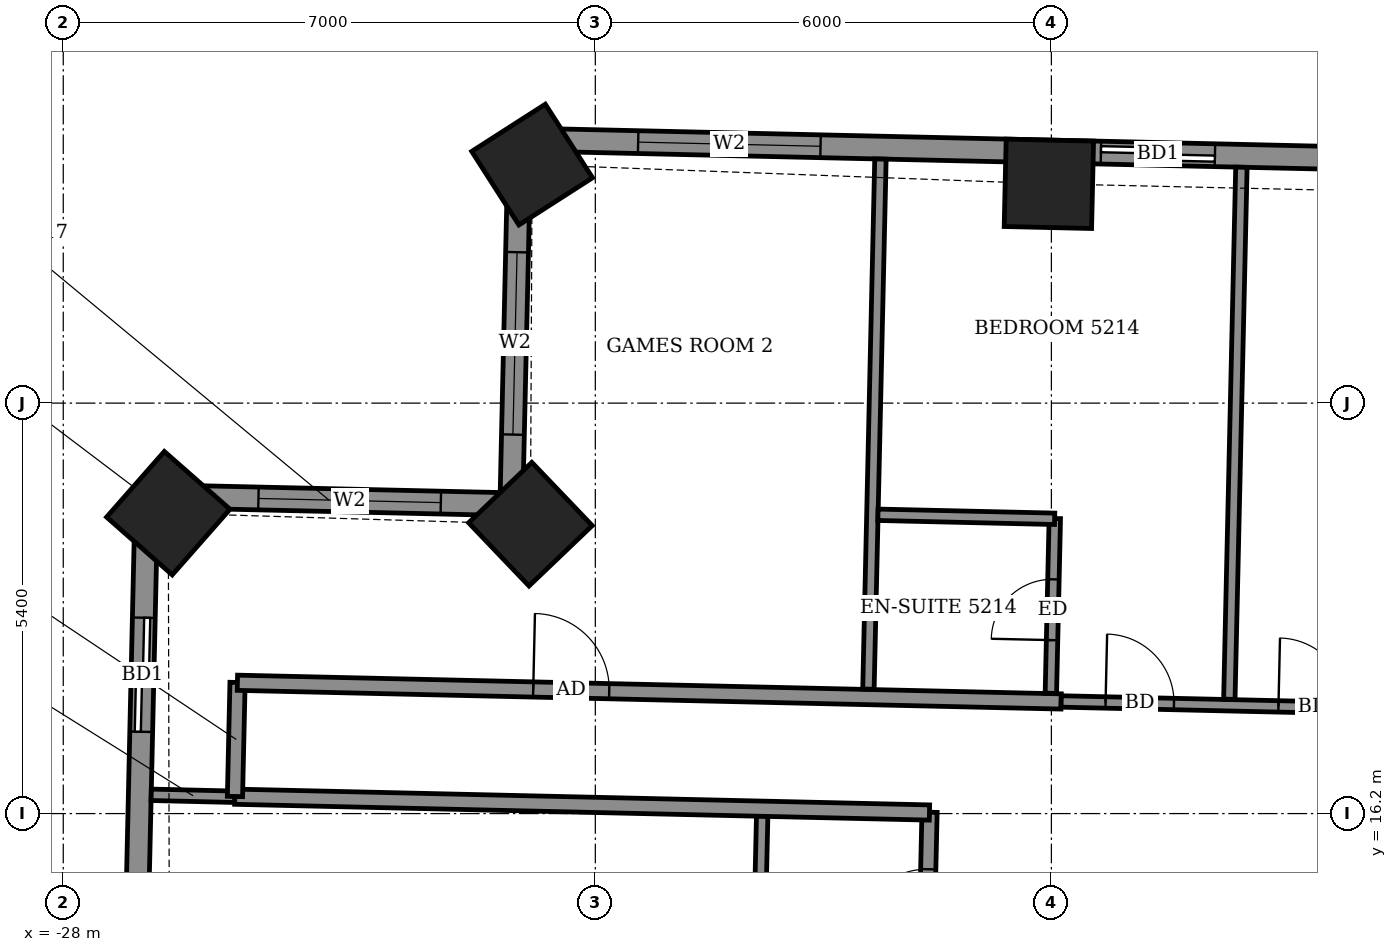
"""IFC4 building model, lengths in metres.
Left out: names, types, materials, properties, quantities, classifications, styles, units other than length and angle.
Written with IfcOpenShell. Run it as: python <this file> out.ifc"""

import sys

from ifc_helpers import new_model, si_unit, direction, frame, frame_2d, origin, origin_2d, place, context, subcontext, project, spatial, rectangle, extrude, element, fill, save


model = new_model("IFC4")
c1 = context("Model", 3, precision=1e-05, world=origin(), true_north=direction((0.0, 1.0)))
c2 = subcontext(c1, "Body", "Model", "MODEL_VIEW")
j1 = project(units=[si_unit("LENGTHUNIT", "METRE"), si_unit("PLANEANGLEUNIT", "RADIAN")], contexts=[c1])
p1 = place(None, origin())
s1 = spatial("IfcSite", under=j1, at=p1, CompositionType="ELEMENT")
p2 = place(p1, origin())
s2 = spatial("IfcBuilding", under=s1, at=p2, CompositionType="ELEMENT")
p3 = place(p2, frame((0.0, 0.0, 205.1)))
s3 = spatial("IfcBuildingStorey", under=s2, at=p3, CompositionType="ELEMENT", Elevation=205.1)
for number, where, z_axis, x_axis in (
    (1, (-15.033, 24.485, -0.55), (0.0, 0.0, 1.0), (-1.0, 0.023, 0.0)),
    (2, (-21.832, 24.738, -0.55), (0.0, 0.0, 1.0), (-0.842, -0.54, 0.0)),
    (3, (-21.854, 20.007, -0.55), (0.0, 0.0, 1.0), (-0.723, -0.691, 0.0)),
    (4, (-26.618, 20.152, -0.55), (0.0, 0.0, 1.0), (-0.661, -0.751, 0.0)),
):
    element("IfcColumn", number, at=place(p3, frame(where, z_axis=z_axis, x_axis=x_axis)), inside=s3, PredefinedType="COLUMN", context=c2, shape_type="SweptSolid", body=[
        extrude(rectangle(XDim=1.15, YDim=1.15, at=origin_2d()), origin(), (0.0, 0.0, 1.0), 3.6),
    ])
p4 = place(p3, frame((20.437, 24.106, 0.0), z_axis=(0.0, 0.0, 1.0), x_axis=(-0.999742506232, 0.022691875925, 0.0)))
e5 = element("IfcWall", 5, at=p4, inside=s3, PredefinedType="SOLIDWALL", context=c2, shape_type="SweptSolid", body=[
    extrude(rectangle(XDim=42.444, YDim=0.3, at=frame_2d((21.222, 0.0))), origin(), (0.0, 0.0, 1.0), 3.05),
])
p5 = place(p4, frame((2.287, 0.0, 0.0)))
e6 = element("IfcOpeningElement", 6, at=p5, cuts=e5, PredefinedType="OPENING", context=c2, shape_type="SweptSolid", body=[
    extrude(rectangle(XDim=1.5, YDim=2.4, at=frame_2d((0.75, 1.2))), frame((0.0, 0.16, 0.0), z_axis=(0.0, -1.0, 0.0), x_axis=(1.0, 0.0, 0.0)), (0.0, 0.0, 1.0), 0.32),
])
p6 = place(p4, frame((7.947, 0.0, 0.0)))
e7 = element("IfcOpeningElement", 7, at=p6, cuts=e5, PredefinedType="OPENING", context=c2, shape_type="SweptSolid", body=[
    extrude(rectangle(XDim=1.5, YDim=2.4, at=frame_2d((0.75, 1.2))), frame((0.0, 0.16, 0.0), z_axis=(0.0, -1.0, 0.0), x_axis=(1.0, 0.0, 0.0)), (0.0, 0.0, 1.0), 0.32),
])
p7 = place(p4, frame((11.184, 0.0, 0.0)))
e8 = element("IfcOpeningElement", 8, at=p7, cuts=e5, PredefinedType="OPENING", context=c2, shape_type="SweptSolid", body=[
    extrude(rectangle(XDim=1.5, YDim=2.4, at=frame_2d((0.75, 1.2))), frame((0.0, 0.16, 0.0), z_axis=(0.0, -1.0, 0.0), x_axis=(1.0, 0.0, 0.0)), (0.0, 0.0, 1.0), 0.32),
])
p8 = place(p4, frame((16.469, 0.0, 0.0)))
e9 = element("IfcOpeningElement", 9, at=p8, cuts=e5, PredefinedType="OPENING", context=c2, shape_type="SweptSolid", body=[
    extrude(rectangle(XDim=1.5, YDim=2.4, at=frame_2d((0.75, 1.2))), frame((0.0, 0.16, 0.0), z_axis=(0.0, -1.0, 0.0), x_axis=(1.0, 0.0, 0.0)), (0.0, 0.0, 1.0), 0.32),
])
p9 = place(p4, frame((22.02, 0.0, 0.0)))
e10 = element("IfcOpeningElement", 10, at=p9, cuts=e5, PredefinedType="OPENING", context=c2, shape_type="SweptSolid", body=[
    extrude(rectangle(XDim=1.5, YDim=2.4, at=frame_2d((0.75, 1.2))), frame((0.0, 0.16, 0.0), z_axis=(0.0, -1.0, 0.0), x_axis=(1.0, 0.0, 0.0)), (0.0, 0.0, 1.0), 0.32),
])
p10 = place(p4, frame((25.257, 0.0, 0.0)))
e11 = element("IfcOpeningElement", 11, at=p10, cuts=e5, PredefinedType="OPENING", context=c2, shape_type="SweptSolid", body=[
    extrude(rectangle(XDim=1.5, YDim=2.4, at=frame_2d((0.75, 1.2))), frame((0.0, 0.16, 0.0), z_axis=(0.0, -1.0, 0.0), x_axis=(1.0, 0.0, 0.0)), (0.0, 0.0, 1.0), 0.32),
])
p11 = place(p4, frame((30.057, 0.0, 0.0)))
e12 = element("IfcOpeningElement", 12, at=p11, cuts=e5, PredefinedType="OPENING", context=c2, shape_type="SweptSolid", body=[
    extrude(rectangle(XDim=1.5, YDim=2.4, at=frame_2d((0.75, 1.2))), frame((0.0, 0.16, 0.0), z_axis=(0.0, -1.0, 0.0), x_axis=(1.0, 0.0, 0.0)), (0.0, 0.0, 1.0), 0.32),
])
p12 = place(p4, frame((33.294, 0.0, 0.0)))
e13 = element("IfcOpeningElement", 13, at=p12, cuts=e5, PredefinedType="OPENING", context=c2, shape_type="SweptSolid", body=[
    extrude(rectangle(XDim=1.5, YDim=2.4, at=frame_2d((0.75, 1.2))), frame((0.0, 0.16, 0.0), z_axis=(0.0, -1.0, 0.0), x_axis=(1.0, 0.0, 0.0)), (0.0, 0.0, 1.0), 0.32),
])
p13 = place(p4, frame((38.484, 0.0, 0.9)))
e14 = element("IfcOpeningElement", 14, at=p13, cuts=e5, PredefinedType="OPENING", context=c2, shape_type="SweptSolid", body=[
    extrude(rectangle(XDim=2.4, YDim=1.5, at=frame_2d((1.2, 0.75))), frame((0.0, 0.16, 0.0), z_axis=(0.0, -1.0, 0.0), x_axis=(1.0, 0.0, 0.0)), (0.0, 0.0, 1.0), 0.32),
])
p14 = place(p3, frame((-21.996, 25.069, 0.0), z_axis=(0.0, 0.0, 1.0), x_axis=(-0.022683280499, -0.999742701292, 0.0)))
e15 = element("IfcWall", 15, at=p14, inside=s3, PredefinedType="SOLIDWALL", context=c2, shape_type="SweptSolid", body=[
    extrude(rectangle(XDim=4.8, YDim=0.3, at=frame_2d((2.4, 0.0))), origin(), (0.0, 0.0, 1.0), 2.55),
])
p15 = place(p14, frame((1.484, 0.0, 0.9)))
e16 = element("IfcOpeningElement", 16, at=p15, cuts=e15, PredefinedType="OPENING", context=c2, shape_type="SweptSolid", body=[
    extrude(rectangle(XDim=2.4, YDim=1.5, at=frame_2d((1.2, 0.75))), frame((0.0, 0.16, 0.0), z_axis=(0.0, -1.0, 0.0), x_axis=(1.0, 0.0, 0.0)), (0.0, 0.0, 1.0), 0.32),
])
p16 = place(p3, frame((-22.105, 20.27, 0.0), z_axis=(0.0, 0.0, 1.0), x_axis=(-0.999742701292, 0.022683280499, 0.0)))
e17 = element("IfcWall", 17, at=p16, inside=s3, PredefinedType="SOLIDWALL", context=c2, shape_type="SweptSolid", body=[
    extrude(rectangle(XDim=4.8, YDim=0.3, at=frame_2d((2.4, 0.0))), origin(), (0.0, 0.0, 1.0), 2.55),
])
p17 = place(p16, frame((0.928, 0.0, 0.9)))
e18 = element("IfcOpeningElement", 18, at=p17, cuts=e17, PredefinedType="OPENING", context=c2, shape_type="SweptSolid", body=[
    extrude(rectangle(XDim=2.4, YDim=1.5, at=frame_2d((1.2, 0.75))), frame((0.0, 0.16, 0.0), z_axis=(0.0, -1.0, 0.0), x_axis=(1.0, 0.0, 0.0)), (0.0, 0.0, 1.0), 0.32),
])
p18 = place(p3, frame((-26.904, 20.379, 0.0), z_axis=(0.0, 0.0, 1.0), x_axis=(-0.022671687694, -0.999742964255, 0.0)))
e19 = element("IfcWall", 19, at=p18, inside=s3, PredefinedType="SOLIDWALL", context=c2, shape_type="SweptSolid", body=[
    extrude(rectangle(XDim=11.824, YDim=0.3, at=frame_2d((5.912, 0.0))), origin(), (0.0, 0.0, 1.0), 2.55),
])
p19 = place(p18, frame((1.603, 0.0, 0.0)))
e20 = element("IfcOpeningElement", 20, at=p19, cuts=e19, PredefinedType="OPENING", context=c2, shape_type="SweptSolid", body=[
    extrude(rectangle(XDim=1.5, YDim=2.4, at=frame_2d((0.75, 1.2))), frame((0.0, 0.16, 0.0), z_axis=(0.0, -1.0, 0.0), x_axis=(1.0, 0.0, 0.0)), (0.0, 0.0, 1.0), 0.32),
])
p20 = place(p18, frame((7.218, 0.0, 0.9)))
e21 = element("IfcOpeningElement", 21, at=p20, cuts=e19, PredefinedType="OPENING", context=c2, shape_type="SweptSolid", body=[
    extrude(rectangle(XDim=2.4, YDim=1.5, at=frame_2d((1.2, 0.75))), frame((0.0, 0.16, 0.0), z_axis=(0.0, -1.0, 0.0), x_axis=(1.0, 0.0, 0.0)), (0.0, 0.0, 1.0), 0.32),
])
p21 = place(p3, frame((-17.247, -12.149, 0.0), z_axis=(0.0, 0.0, 1.0), x_axis=(0.022698146637, 0.999742363881, 0.0)))
e22 = element("IfcWall", 22, at=p21, inside=s3, PredefinedType="PARTITIONING", context=c2, shape_type="SweptSolid", body=[
    extrude(rectangle(XDim=28.374, YDim=0.2, at=frame_2d((14.187, 0.0))), origin(), (0.0, 0.0, 1.0), 3.05),
])
p22 = place(p21, frame((23.0, 0.0, 0.0)))
e23 = element("IfcOpeningElement", 23, at=p22, cuts=e22, PredefinedType="OPENING", context=c2, shape_type="SweptSolid", body=[
    extrude(rectangle(XDim=1.0, YDim=2.1, at=frame_2d((0.5, 1.05))), frame((0.0, 0.11, 0.0), z_axis=(0.0, -1.0, 0.0), x_axis=(1.0, 0.0, 0.0)), (0.0, 0.0, 1.0), 0.22),
])
p23 = place(p21, frame((26.724, 0.0, 0.0)))
e24 = element("IfcOpeningElement", 24, at=p23, cuts=e22, PredefinedType="OPENING", context=c2, shape_type="SweptSolid", body=[
    extrude(rectangle(XDim=0.9, YDim=2.1, at=frame_2d((0.45, 1.05))), frame((0.0, 0.11, 0.0), z_axis=(0.0, -1.0, 0.0), x_axis=(1.0, 0.0, 0.0)), (0.0, 0.0, 1.0), 0.22),
])
p24 = place(p21, frame((17.025, 0.0, 0.0)))
e25 = element("IfcOpeningElement", 25, at=p24, cuts=e22, PredefinedType="OPENING", context=c2, shape_type="SweptSolid", body=[
    extrude(rectangle(XDim=1.0, YDim=2.1, at=frame_2d((0.5, 1.05))), frame((0.0, 0.11, 0.0), z_axis=(0.0, -1.0, 0.0), x_axis=(1.0, 0.0, 0.0)), (0.0, 0.0, 1.0), 0.22),
])
p25 = place(p21, frame((19.275, 0.0, 0.0)))
e26 = element("IfcOpeningElement", 26, at=p25, cuts=e22, PredefinedType="OPENING", context=c2, shape_type="SweptSolid", body=[
    extrude(rectangle(XDim=0.9, YDim=2.1, at=frame_2d((0.45, 1.05))), frame((0.0, 0.11, 0.0), z_axis=(0.0, -1.0, 0.0), x_axis=(1.0, 0.0, 0.0)), (0.0, 0.0, 1.0), 0.22),
])
p26 = place(p21, frame((14.95, 0.0, 0.0)))
e27 = element("IfcOpeningElement", 27, at=p26, cuts=e22, PredefinedType="OPENING", context=c2, shape_type="SweptSolid", body=[
    extrude(rectangle(XDim=1.0, YDim=2.1, at=frame_2d((0.5, 1.05))), frame((0.0, 0.11, 0.0), z_axis=(0.0, -1.0, 0.0), x_axis=(1.0, 0.0, 0.0)), (0.0, 0.0, 1.0), 0.22),
])
p27 = place(p21, frame((12.625, 0.0, 0.0)))
e28 = element("IfcOpeningElement", 28, at=p27, cuts=e22, PredefinedType="OPENING", context=c2, shape_type="SweptSolid", body=[
    extrude(rectangle(XDim=0.9, YDim=2.1, at=frame_2d((0.45, 1.05))), frame((0.0, 0.11, 0.0), z_axis=(0.0, -1.0, 0.0), x_axis=(1.0, 0.0, 0.0)), (0.0, 0.0, 1.0), 0.22),
])
p28 = place(p21, frame((10.275, 0.0, 0.0)))
e29 = element("IfcOpeningElement", 29, at=p28, cuts=e22, PredefinedType="OPENING", context=c2, shape_type="SweptSolid", body=[
    extrude(rectangle(XDim=1.0, YDim=2.1, at=frame_2d((0.5, 1.05))), frame((0.0, 0.11, 0.0), z_axis=(0.0, -1.0, 0.0), x_axis=(1.0, 0.0, 0.0)), (0.0, 0.0, 1.0), 0.22),
])
p29 = place(p21, frame((8.025, 0.0, 0.0)))
e30 = element("IfcOpeningElement", 30, at=p29, cuts=e22, PredefinedType="OPENING", context=c2, shape_type="SweptSolid", body=[
    extrude(rectangle(XDim=0.9, YDim=2.1, at=frame_2d((0.45, 1.05))), frame((0.0, 0.11, 0.0), z_axis=(0.0, -1.0, 0.0), x_axis=(1.0, 0.0, 0.0)), (0.0, 0.0, 1.0), 0.22),
])
p30 = place(p21, frame((4.337, 0.0, 0.0)))
e31 = element("IfcOpeningElement", 31, at=p30, cuts=e22, PredefinedType="OPENING", context=c2, shape_type="SweptSolid", body=[
    extrude(rectangle(XDim=1.0, YDim=2.1, at=frame_2d((0.5, 1.05))), frame((0.0, 0.11, 0.0), z_axis=(0.0, -1.0, 0.0), x_axis=(1.0, 0.0, 0.0)), (0.0, 0.0, 1.0), 0.22),
])
p31 = place(p21, frame((0.75, 0.0, 0.0)))
e32 = element("IfcOpeningElement", 32, at=p31, cuts=e22, PredefinedType="OPENING", context=c2, shape_type="SweptSolid", body=[
    extrude(rectangle(XDim=0.9, YDim=2.1, at=frame_2d((0.45, 1.05))), frame((0.0, 0.11, 0.0), z_axis=(0.0, -1.0, 0.0), x_axis=(1.0, 0.0, 0.0)), (0.0, 0.0, 1.0), 0.22),
])
p32 = place(p3, frame((-18.857, 13.869, 0.0), z_axis=(0.0, 0.0, 1.0), x_axis=(0.022612884682, 0.999744296031, 0.0)))
e33 = element("IfcWall", 33, at=p32, inside=s3, PredefinedType="PARTITIONING", context=c2, shape_type="SweptSolid", body=[
    extrude(rectangle(XDim=2.3, YDim=0.15, at=frame_2d((1.15, 0.0))), origin(), (0.0, 0.0, 1.0), 3.05),
])
p33 = place(p3, frame((-26.843, 16.447, 0.0), z_axis=(0.0, 0.0, 1.0), x_axis=(0.999720170098, -0.023655475055, 0.0)))
e34 = element("IfcWall", 34, at=p33, inside=s3, PredefinedType="PARTITIONING", context=c2, shape_type="SweptSolid", body=[
    extrude(rectangle(XDim=1.104, YDim=0.15, at=frame_2d((0.552, 0.0))), origin(), (0.0, 0.0, 1.0), 2.55),
])
p34 = place(p3, frame((-25.743, 16.422, 0.0), z_axis=(0.0, 0.0, 1.0), x_axis=(0.999741076645, -0.022754772455, 0.0)))
e35 = element("IfcWall", 35, at=p34, inside=s3, PredefinedType="PARTITIONING", context=c2, shape_type="SweptSolid", body=[
    extrude(rectangle(XDim=9.141, YDim=0.2, at=frame_2d((4.571, 0.0))), origin(), (0.0, 0.0, 1.0), 3.05),
])
p35 = place(p3, frame((-25.741, 16.425, 0.0), z_axis=(0.0, 0.0, 1.0), x_axis=(0.022617910375, 0.999744182344, 0.0)))
e36 = element("IfcWall", 36, at=p35, inside=s3, PredefinedType="PARTITIONING", context=c2, shape_type="SweptSolid", body=[
    extrude(rectangle(XDim=1.5, YDim=0.2, at=frame_2d((0.75, 0.0))), origin(), (0.0, 0.0, 1.0), 3.05),
])
p36 = place(p3, frame((-25.709, 17.921, 0.0), z_axis=(0.0, 0.0, 1.0), x_axis=(0.999742764922, -0.022680475901, 0.0)))
e37 = element("IfcWall", 37, at=p36, inside=s3, PredefinedType="PARTITIONING", context=c2, shape_type="SweptSolid", body=[
    extrude(rectangle(XDim=10.84, YDim=0.2, at=frame_2d((5.42, 0.0))), origin(), (0.0, 0.0, 1.0), 3.05),
])
p37 = place(p36, frame((3.893, 0.0, 0.0)))
e38 = element("IfcOpeningElement", 38, at=p37, cuts=e37, PredefinedType="OPENING", context=c2, shape_type="SweptSolid", body=[
    extrude(rectangle(XDim=1.0, YDim=2.1, at=frame_2d((0.5, 1.05))), frame((0.0, 0.11, 0.0), z_axis=(0.0, -1.0, 0.0), x_axis=(1.0, 0.0, 0.0)), (0.0, 0.0, 1.0), 0.22),
])
p38 = place(p3, frame((-14.871, 17.675, 0.0), z_axis=(0.0, 0.0, 1.0), x_axis=(0.999742359486, -0.02269834024, 0.0)))
e39 = element("IfcWall", 39, at=p38, inside=s3, PredefinedType="PARTITIONING", context=c2, shape_type="SweptSolid", body=[
    extrude(rectangle(XDim=30.536, YDim=0.15, at=frame_2d((15.268, 0.0))), origin(), (0.0, 0.0, 1.0), 3.05),
])
p39 = place(p38, frame((28.159, 0.0, 0.0)))
e40 = element("IfcOpeningElement", 40, at=p39, cuts=e39, PredefinedType="OPENING", context=c2, shape_type="SweptSolid", body=[
    extrude(rectangle(XDim=0.9, YDim=2.1, at=frame_2d((0.45, 1.05))), frame((0.0, 0.085, 0.0), z_axis=(0.0, -1.0, 0.0), x_axis=(1.0, 0.0, 0.0)), (0.0, 0.0, 1.0), 0.17),
])
p40 = place(p38, frame((21.034, 0.0, 0.0)))
e41 = element("IfcOpeningElement", 41, at=p40, cuts=e39, PredefinedType="OPENING", context=c2, shape_type="SweptSolid", body=[
    extrude(rectangle(XDim=0.9, YDim=2.1, at=frame_2d((0.45, 1.05))), frame((0.0, 0.085, 0.0), z_axis=(0.0, -1.0, 0.0), x_axis=(1.0, 0.0, 0.0)), (0.0, 0.0, 1.0), 0.17),
])
p41 = place(p38, frame((18.684, 0.0, 0.0)))
e42 = element("IfcOpeningElement", 42, at=p41, cuts=e39, PredefinedType="OPENING", context=c2, shape_type="SweptSolid", body=[
    extrude(rectangle(XDim=0.9, YDim=2.1, at=frame_2d((0.45, 1.05))), frame((0.0, 0.085, 0.0), z_axis=(0.0, -1.0, 0.0), x_axis=(1.0, 0.0, 0.0)), (0.0, 0.0, 1.0), 0.17),
])
p42 = place(p38, frame((11.709, 0.0, 0.0)))
e43 = element("IfcOpeningElement", 43, at=p42, cuts=e39, PredefinedType="OPENING", context=c2, shape_type="SweptSolid", body=[
    extrude(rectangle(XDim=0.9, YDim=2.1, at=frame_2d((0.45, 1.05))), frame((0.0, 0.085, 0.0), z_axis=(0.0, -1.0, 0.0), x_axis=(1.0, 0.0, 0.0)), (0.0, 0.0, 1.0), 0.17),
])
p43 = place(p38, frame((9.734, 0.0, 0.0)))
e44 = element("IfcOpeningElement", 44, at=p43, cuts=e39, PredefinedType="OPENING", context=c2, shape_type="SweptSolid", body=[
    extrude(rectangle(XDim=0.9, YDim=2.1, at=frame_2d((0.45, 1.05))), frame((0.0, 0.085, 0.0), z_axis=(0.0, -1.0, 0.0), x_axis=(1.0, 0.0, 0.0)), (0.0, 0.0, 1.0), 0.17),
])
p44 = place(p38, frame((2.859, 0.0, 0.0)))
e45 = element("IfcOpeningElement", 45, at=p44, cuts=e39, PredefinedType="OPENING", context=c2, shape_type="SweptSolid", body=[
    extrude(rectangle(XDim=0.9, YDim=2.1, at=frame_2d((0.45, 1.05))), frame((0.0, 0.085, 0.0), z_axis=(0.0, -1.0, 0.0), x_axis=(1.0, 0.0, 0.0)), (0.0, 0.0, 1.0), 0.17),
])
p45 = place(p38, frame((0.584, 0.0, 0.0)))
e46 = element("IfcOpeningElement", 46, at=p45, cuts=e39, PredefinedType="OPENING", context=c2, shape_type="SweptSolid", body=[
    extrude(rectangle(XDim=0.9, YDim=2.1, at=frame_2d((0.45, 1.05))), frame((0.0, 0.085, 0.0), z_axis=(0.0, -1.0, 0.0), x_axis=(1.0, 0.0, 0.0)), (0.0, 0.0, 1.0), 0.17),
])
p46 = place(p3, frame((-17.407, 17.837, 0.0), z_axis=(0.0, 0.0, 1.0), x_axis=(0.022643496158, 0.999743603171, 0.0)))
e47 = element("IfcWall", 47, at=p46, inside=s3, PredefinedType="PARTITIONING", context=c2, shape_type="SweptSolid", body=[
    extrude(rectangle(XDim=6.976, YDim=0.15, at=frame_2d((3.488, 0.0))), origin(), (0.0, 0.0, 1.0), 2.55),
])
p47 = place(p3, frame((-15.007, 17.782, 0.0), z_axis=(0.0, 0.0, 1.0), x_axis=(0.022603288534, 0.999744513037, 0.0)))
e48 = element("IfcWall", 48, at=p47, inside=s3, PredefinedType="PARTITIONING", context=c2, shape_type="SweptSolid", body=[
    extrude(rectangle(XDim=2.301, YDim=0.15, at=frame_2d((1.15, 0.0))), origin(), (0.0, 0.0, 1.0), 3.05),
])
p48 = place(p47, frame((0.7, 0.0, 0.0)))
e49 = element("IfcOpeningElement", 49, at=p48, cuts=e48, PredefinedType="OPENING", context=c2, shape_type="SweptSolid", body=[
    extrude(rectangle(XDim=0.8, YDim=2.1, at=frame_2d((0.4, 1.05))), frame((0.0, 0.085, 0.0), z_axis=(0.0, -1.0, 0.0), x_axis=(1.0, 0.0, 0.0)), (0.0, 0.0, 1.0), 0.17),
])
p49 = place(p3, frame((-12.659, 17.704, 0.0), z_axis=(0.0, 0.0, 1.0), x_axis=(0.022703185001, 0.999742249478, 0.0)))
e50 = element("IfcWall", 50, at=p49, inside=s3, PredefinedType="PARTITIONING", context=c2, shape_type="SweptSolid", body=[
    extrude(rectangle(XDim=7.0, YDim=0.15, at=frame_2d((3.5, 0.0))), origin(), (0.0, 0.0, 1.0), 2.55),
])
p50 = place(p3, frame((-17.282, 20.131, 0.0), z_axis=(0.0, 0.0, 1.0), x_axis=(0.999738082346, -0.022885950011, 0.0)))
e51 = element("IfcWall", 51, at=p50, inside=s3, PredefinedType="PARTITIONING", context=c2, shape_type="SweptSolid", body=[
    extrude(rectangle(XDim=2.325, YDim=0.15, at=frame_2d((1.163, 0.0))), origin(), (0.0, 0.0, 1.0), 3.05),
])
p51 = place(p12, origin())
e52 = element("IfcDoor", 52, at=p51, inside=s3, OperationType="SLIDING_TO_LEFT", PredefinedType="DOOR", context=c2, shape_type="SweptSolid", body=[
    extrude(rectangle(XDim=1.5, YDim=2.4, at=frame_2d((0.75, 1.2))), frame((0.0, 0.025, 0.0), z_axis=(0.0, -1.0, 0.0), x_axis=(1.0, 0.0, 0.0)), (0.0, 0.0, 1.0), 0.05),
])
fill(e13, e52)
p52 = place(p13, origin())
e53 = element("IfcWindow", 53, at=p52, inside=s3, PartitioningType="DOUBLE_PANEL_VERTICAL", PredefinedType="WINDOW", context=c2, shape_type="SweptSolid", body=[
    extrude(rectangle(XDim=2.4, YDim=1.5, at=frame_2d((1.2, 0.75))), frame((0.0, 0.03, 0.0), z_axis=(0.0, -1.0, 0.0), x_axis=(1.0, 0.0, 0.0)), (0.0, 0.0, 1.0), 0.06),
])
fill(e14, e53)
p53 = place(p15, origin())
e54 = element("IfcWindow", 54, at=p53, inside=s3, PartitioningType="DOUBLE_PANEL_VERTICAL", PredefinedType="WINDOW", context=c2, shape_type="SweptSolid", body=[
    extrude(rectangle(XDim=2.4, YDim=1.5, at=frame_2d((1.2, 0.75))), frame((0.0, 0.03, 0.0), z_axis=(0.0, -1.0, 0.0), x_axis=(1.0, 0.0, 0.0)), (0.0, 0.0, 1.0), 0.06),
])
fill(e16, e54)
p54 = place(p17, origin())
e55 = element("IfcWindow", 55, at=p54, inside=s3, PartitioningType="DOUBLE_PANEL_VERTICAL", PredefinedType="WINDOW", context=c2, shape_type="SweptSolid", body=[
    extrude(rectangle(XDim=2.4, YDim=1.5, at=frame_2d((1.2, 0.75))), frame((0.0, 0.03, 0.0), z_axis=(0.0, -1.0, 0.0), x_axis=(1.0, 0.0, 0.0)), (0.0, 0.0, 1.0), 0.06),
])
fill(e18, e55)
p55 = place(p19, origin())
e56 = element("IfcDoor", 56, at=p55, inside=s3, OperationType="SLIDING_TO_LEFT", PredefinedType="DOOR", context=c2, shape_type="SweptSolid", body=[
    extrude(rectangle(XDim=1.5, YDim=2.4, at=frame_2d((0.75, 1.2))), frame((0.0, 0.025, 0.0), z_axis=(0.0, -1.0, 0.0), x_axis=(1.0, 0.0, 0.0)), (0.0, 0.0, 1.0), 0.05),
])
fill(e20, e56)
p56 = place(p44, origin())
e57 = element("IfcDoor", 57, at=p56, inside=s3, OperationType="SINGLE_SWING_LEFT", PredefinedType="DOOR", context=c2, shape_type="SweptSolid", body=[
    extrude(rectangle(XDim=0.9, YDim=2.1, at=frame_2d((0.45, 1.05))), frame((0.0, 0.025, 0.0), z_axis=(0.0, -1.0, 0.0), x_axis=(1.0, 0.0, 0.0)), (0.0, 0.0, 1.0), 0.05),
])
fill(e45, e57)
p57 = place(p45, origin())
e58 = element("IfcDoor", 58, at=p57, inside=s3, OperationType="SINGLE_SWING_RIGHT", PredefinedType="DOOR", context=c2, shape_type="SweptSolid", body=[
    extrude(rectangle(XDim=0.9, YDim=2.1, at=frame_2d((0.45, 1.05))), frame((0.0, 0.025, 0.0), z_axis=(0.0, -1.0, 0.0), x_axis=(1.0, 0.0, 0.0)), (0.0, 0.0, 1.0), 0.05),
])
fill(e46, e58)
p58 = place(p48, origin())
e59 = element("IfcDoor", 59, at=p58, inside=s3, OperationType="SINGLE_SWING_RIGHT", PredefinedType="DOOR", context=c2, shape_type="SweptSolid", body=[
    extrude(rectangle(XDim=0.8, YDim=2.1, at=frame_2d((0.4, 1.05))), frame((0.0, 0.025, 0.0), z_axis=(0.0, -1.0, 0.0), x_axis=(1.0, 0.0, 0.0)), (0.0, 0.0, 1.0), 0.05),
])
fill(e49, e59)
p59 = place(p37, origin())
e60 = element("IfcDoor", 60, at=p59, inside=s3, OperationType="SINGLE_SWING_RIGHT", PredefinedType="DOOR", context=c2, shape_type="SweptSolid", body=[
    extrude(rectangle(XDim=1.0, YDim=2.1, at=frame_2d((0.5, 1.05))), frame((0.0, 0.025, 0.0), z_axis=(0.0, -1.0, 0.0), x_axis=(1.0, 0.0, 0.0)), (0.0, 0.0, 1.0), 0.05),
])
fill(e38, e60)
p60 = place(p23, origin())
e61 = element("IfcDoor", 61, at=p60, inside=s3, OperationType="SINGLE_SWING_RIGHT", PredefinedType="DOOR", context=c2, shape_type="SweptSolid", body=[
    extrude(rectangle(XDim=0.9, YDim=2.1, at=frame_2d((0.45, 1.05))), frame((0.0, 0.025, 0.0), z_axis=(0.0, -1.0, 0.0), x_axis=(1.0, 0.0, 0.0)), (0.0, 0.0, 1.0), 0.05),
])
fill(e24, e61)
save(model, sys.argv[1])
